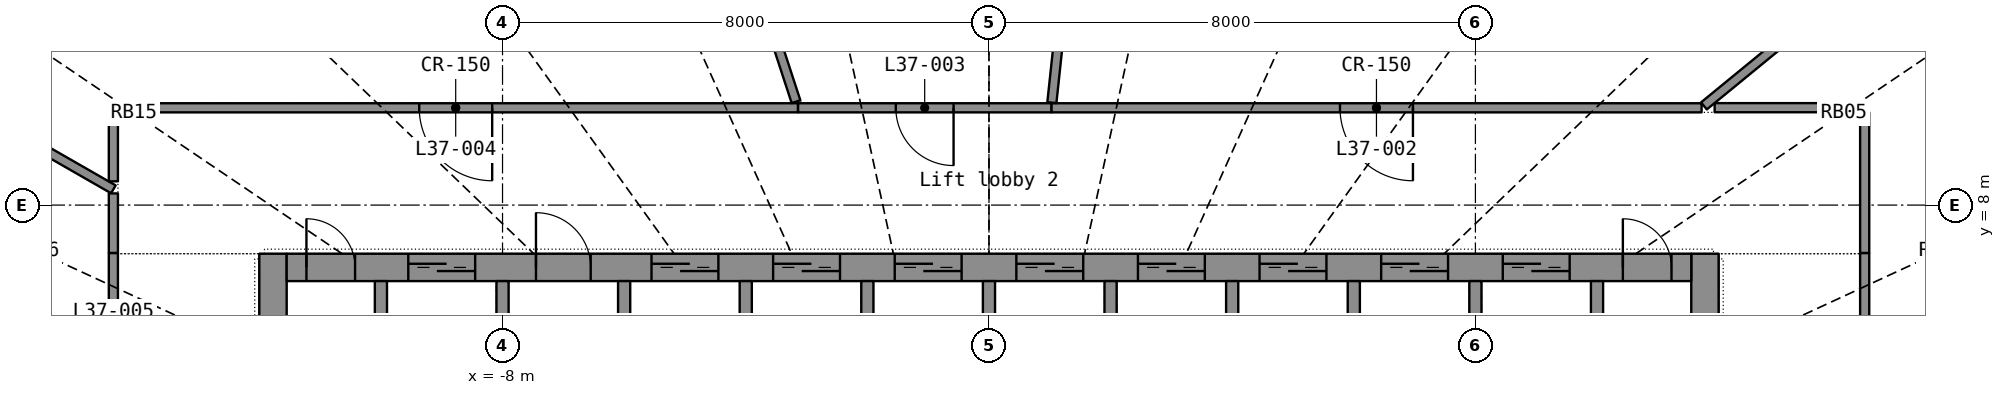
"""IFC4 building model, lengths in metres.
Left out: names, types, materials, properties, quantities, classifications, styles, units other than length and angle.
Written with IfcOpenShell. Run it as: python <this file> out.ifc"""

import sys

from ifc_helpers import new_model, si_unit, direction, frame, frame_2d, origin, place, context, subcontext, project, spatial, rectangle, extrude, element, fill, save


model = new_model("IFC4")
c1 = context("Model", 3, precision=1e-05, world=origin(), true_north=direction((0.0, 1.0)))
c2 = subcontext(c1, "Body", "Model", "MODEL_VIEW")
j1 = project(units=[si_unit("LENGTHUNIT", "METRE"), si_unit("PLANEANGLEUNIT", "RADIAN")], contexts=[c1])
p1 = place(None, origin())
s1 = spatial("IfcSite", under=j1, at=p1, CompositionType="ELEMENT")
p2 = place(p1, origin())
s2 = spatial("IfcBuilding", under=s1, at=p2, CompositionType="ELEMENT")
p3 = place(p2, frame((0.0, 0.0, 157.1)))
s3 = spatial("IfcBuildingStorey", under=s2, at=p3, CompositionType="ELEMENT", Elevation=157.1)
p4 = place(p3, frame((-11.775, -7.2, 0.0), z_axis=(0.0, 0.0, 1.0), x_axis=(0.0, 1.0, 0.0)))
e1 = element("IfcWall", 1, at=p4, inside=s3, PredefinedType="SHEAR", context=c2, shape_type="SweptSolid", body=[
    extrude(rectangle(XDim=14.4, YDim=0.45, at=frame_2d((7.2, 0.0))), origin(), (0.0, 0.0, 1.0), 3.3),
])
p5 = place(p4, frame((6.5, 0.0, 0.0)))
e2 = element("IfcOpeningElement", 2, at=p5, cuts=e1, PredefinedType="OPENING", context=c2, shape_type="SweptSolid", body=[
    extrude(rectangle(XDim=1.4, YDim=2.2, at=frame_2d((0.7, 1.1))), frame((0.0, 0.235, 0.0), z_axis=(0.0, -1.0, 0.0), x_axis=(1.0, 0.0, 0.0)), (0.0, 0.0, 1.0), 0.47),
])
p6 = place(p3, frame((11.775, -7.2, 0.0), z_axis=(0.0, 0.0, 1.0), x_axis=(0.0, 1.0, 0.0)))
e3 = element("IfcWall", 3, at=p6, inside=s3, PredefinedType="SHEAR", context=c2, shape_type="SweptSolid", body=[
    extrude(rectangle(XDim=14.4, YDim=0.45, at=frame_2d((7.2, 0.0))), origin(), (0.0, 0.0, 1.0), 3.3),
])
p7 = place(p6, frame((6.5, 0.0, 0.0)))
e4 = element("IfcOpeningElement", 4, at=p7, cuts=e3, PredefinedType="OPENING", context=c2, shape_type="SweptSolid", body=[
    extrude(rectangle(XDim=1.4, YDim=2.2, at=frame_2d((0.7, 1.1))), frame((0.0, 0.235, 0.0), z_axis=(0.0, -1.0, 0.0), x_axis=(1.0, 0.0, 0.0)), (0.0, 0.0, 1.0), 0.47),
])
p8 = place(p3, frame((-11.55, 6.975, 0.0), z_axis=(0.0, 0.0, 1.0), x_axis=(1.0, 0.0, 0.0)))
e5 = element("IfcWall", 5, at=p8, inside=s3, PredefinedType="SHEAR", context=c2, shape_type="SweptSolid", body=[
    extrude(rectangle(XDim=23.1, YDim=0.45, at=frame_2d((11.55, 0.0))), origin(), (0.0, 0.0, 1.0), 3.3),
])
p9 = place(p8, frame((2.0, 0.0, 0.0)))
e6 = element("IfcOpeningElement", 6, at=p9, cuts=e5, PredefinedType="OPENING", context=c2, shape_type="SweptSolid", body=[
    extrude(rectangle(XDim=1.1, YDim=2.2, at=frame_2d((0.55, 1.1))), frame((0.0, 0.235, 0.0), z_axis=(0.0, -1.0, 0.0), x_axis=(1.0, 0.0, 0.0)), (0.0, 0.0, 1.0), 0.47),
])
p10 = place(p8, frame((6.0, 0.0, 0.0)))
e7 = element("IfcOpeningElement", 7, at=p10, cuts=e5, PredefinedType="OPENING", context=c2, shape_type="SweptSolid", body=[
    extrude(rectangle(XDim=1.1, YDim=2.2, at=frame_2d((0.55, 1.1))), frame((0.0, 0.235, 0.0), z_axis=(0.0, -1.0, 0.0), x_axis=(1.0, 0.0, 0.0)), (0.0, 0.0, 1.0), 0.47),
])
p11 = place(p8, frame((8.0, 0.0, 0.0)))
e8 = element("IfcOpeningElement", 8, at=p11, cuts=e5, PredefinedType="OPENING", context=c2, shape_type="SweptSolid", body=[
    extrude(rectangle(XDim=1.1, YDim=2.2, at=frame_2d((0.55, 1.1))), frame((0.0, 0.235, 0.0), z_axis=(0.0, -1.0, 0.0), x_axis=(1.0, 0.0, 0.0)), (0.0, 0.0, 1.0), 0.47),
])
p12 = place(p8, frame((10.0, 0.0, 0.0)))
e9 = element("IfcOpeningElement", 9, at=p12, cuts=e5, PredefinedType="OPENING", context=c2, shape_type="SweptSolid", body=[
    extrude(rectangle(XDim=1.1, YDim=2.2, at=frame_2d((0.55, 1.1))), frame((0.0, 0.235, 0.0), z_axis=(0.0, -1.0, 0.0), x_axis=(1.0, 0.0, 0.0)), (0.0, 0.0, 1.0), 0.47),
])
p13 = place(p8, frame((12.0, 0.0, 0.0)))
e10 = element("IfcOpeningElement", 10, at=p13, cuts=e5, PredefinedType="OPENING", context=c2, shape_type="SweptSolid", body=[
    extrude(rectangle(XDim=1.1, YDim=2.2, at=frame_2d((0.55, 1.1))), frame((0.0, 0.235, 0.0), z_axis=(0.0, -1.0, 0.0), x_axis=(1.0, 0.0, 0.0)), (0.0, 0.0, 1.0), 0.47),
])
p14 = place(p8, frame((14.0, 0.0, 0.0)))
e11 = element("IfcOpeningElement", 11, at=p14, cuts=e5, PredefinedType="OPENING", context=c2, shape_type="SweptSolid", body=[
    extrude(rectangle(XDim=1.1, YDim=2.2, at=frame_2d((0.55, 1.1))), frame((0.0, 0.235, 0.0), z_axis=(0.0, -1.0, 0.0), x_axis=(1.0, 0.0, 0.0)), (0.0, 0.0, 1.0), 0.47),
])
p15 = place(p8, frame((16.0, 0.0, 0.0)))
e12 = element("IfcOpeningElement", 12, at=p15, cuts=e5, PredefinedType="OPENING", context=c2, shape_type="SweptSolid", body=[
    extrude(rectangle(XDim=1.1, YDim=2.2, at=frame_2d((0.55, 1.1))), frame((0.0, 0.235, 0.0), z_axis=(0.0, -1.0, 0.0), x_axis=(1.0, 0.0, 0.0)), (0.0, 0.0, 1.0), 0.47),
])
p16 = place(p8, frame((18.0, 0.0, 0.0)))
e13 = element("IfcOpeningElement", 13, at=p16, cuts=e5, PredefinedType="OPENING", context=c2, shape_type="SweptSolid", body=[
    extrude(rectangle(XDim=1.1, YDim=2.2, at=frame_2d((0.55, 1.1))), frame((0.0, 0.235, 0.0), z_axis=(0.0, -1.0, 0.0), x_axis=(1.0, 0.0, 0.0)), (0.0, 0.0, 1.0), 0.47),
])
p17 = place(p8, frame((20.0, 0.0, 0.0)))
e14 = element("IfcOpeningElement", 14, at=p17, cuts=e5, PredefinedType="OPENING", context=c2, shape_type="SweptSolid", body=[
    extrude(rectangle(XDim=1.1, YDim=2.2, at=frame_2d((0.55, 1.1))), frame((0.0, 0.235, 0.0), z_axis=(0.0, -1.0, 0.0), x_axis=(1.0, 0.0, 0.0)), (0.0, 0.0, 1.0), 0.47),
])
p18 = place(p8, frame((4.1, 0.0, 0.0)))
e15 = element("IfcOpeningElement", 15, at=p18, cuts=e5, PredefinedType="OPENING", context=c2, shape_type="SweptSolid", body=[
    extrude(rectangle(XDim=0.9, YDim=2.1, at=frame_2d((0.45, 1.05))), frame((0.0, 0.235, 0.0), z_axis=(0.0, -1.0, 0.0), x_axis=(1.0, 0.0, 0.0)), (0.0, 0.0, 1.0), 0.47),
])
p19 = place(p8, frame((0.325, 0.0, 0.0)))
e16 = element("IfcOpeningElement", 16, at=p19, cuts=e5, PredefinedType="OPENING", context=c2, shape_type="SweptSolid", body=[
    extrude(rectangle(XDim=0.8, YDim=2.05, at=frame_2d((0.4, 1.025))), frame((0.0, 0.235, 0.0), z_axis=(0.0, -1.0, 0.0), x_axis=(1.0, 0.0, 0.0)), (0.0, 0.0, 1.0), 0.47),
])
p20 = place(p8, frame((21.975, 0.0, 0.0)))
e17 = element("IfcOpeningElement", 17, at=p20, cuts=e5, PredefinedType="OPENING", context=c2, shape_type="SweptSolid", body=[
    extrude(rectangle(XDim=0.8, YDim=2.05, at=frame_2d((0.4, 1.025))), frame((0.0, 0.235, 0.0), z_axis=(0.0, -1.0, 0.0), x_axis=(1.0, 0.0, 0.0)), (0.0, 0.0, 1.0), 0.47),
])
for number, where, z_axis, x_axis in (
    (18, (-10.0, 3.9, 0.0), (0.0, 0.0, 1.0), (0.0, 1.0, 0.0)),
    (19, (-8.0, 3.9, 0.0), (0.0, 0.0, 1.0), (0.0, 1.0, 0.0)),
    (20, (-6.0, 3.9, 0.0), (0.0, 0.0, 1.0), (0.0, 1.0, 0.0)),
    (21, (-4.0, 3.9, 0.0), (0.0, 0.0, 1.0), (0.0, 1.0, 0.0)),
    (22, (-2.0, 3.9, 0.0), (0.0, 0.0, 1.0), (0.0, 1.0, 0.0)),
    (23, (0.0, 3.9, 0.0), (0.0, 0.0, 1.0), (0.0, 1.0, 0.0)),
    (24, (2.0, 3.9, 0.0), (0.0, 0.0, 1.0), (0.0, 1.0, 0.0)),
    (25, (4.0, 3.9, 0.0), (0.0, 0.0, 1.0), (0.0, 1.0, 0.0)),
    (26, (6.0, 3.9, 0.0), (0.0, 0.0, 1.0), (0.0, 1.0, 0.0)),
    (27, (8.0, 3.9, 0.0), (0.0, 0.0, 1.0), (0.0, 1.0, 0.0)),
    (28, (10.0, 3.9, 0.0), (0.0, 0.0, 1.0), (0.0, 1.0, 0.0)),
):
    element("IfcWall", number, at=place(p3, frame(where, z_axis=z_axis, x_axis=x_axis)), inside=s3, PredefinedType="SHEAR", context=c2, shape_type="SweptSolid", body=[
        extrude(rectangle(XDim=2.85, YDim=0.2, at=frame_2d((1.425, 0.0))), origin(), (0.0, 0.0, 1.0), 3.3),
    ])
p21 = place(p3, frame((-3.14, 9.6, 0.0), z_axis=(0.0, 0.0, 1.0), x_axis=(-1.0, 0.0, 0.0)))
e29 = element("IfcWall", 29, at=p21, inside=s3, PredefinedType="PARTITIONING", context=c2, shape_type="SweptSolid", body=[
    extrude(rectangle(XDim=11.26, YDim=0.15, at=frame_2d((5.63, 0.0))), origin(), (0.0, 0.0, 1.0), 2.4),
])
p22 = place(p21, frame((5.03, 0.0, 0.0)))
e30 = element("IfcOpeningElement", 30, at=p22, cuts=e29, PredefinedType="OPENING", context=c2, shape_type="SweptSolid", body=[
    extrude(rectangle(XDim=1.2, YDim=2.2, at=frame_2d((0.6, 1.1))), frame((0.0, 0.085, 0.0), z_axis=(0.0, -1.0, 0.0), x_axis=(1.0, 0.0, 0.0)), (0.0, 0.0, 1.0), 0.17),
])
p23 = place(p3, frame((11.72, 9.6, 0.0), z_axis=(0.0, 0.0, 1.0), x_axis=(-1.0, 0.0, 0.0)))
e31 = element("IfcWall", 31, at=p23, inside=s3, PredefinedType="PARTITIONING", context=c2, shape_type="SweptSolid", body=[
    extrude(rectangle(XDim=10.695, YDim=0.15, at=frame_2d((5.347, 0.0))), origin(), (0.0, 0.0, 1.0), 2.4),
])
p24 = place(p23, frame((4.747, 0.0, 0.0)))
e32 = element("IfcOpeningElement", 32, at=p24, cuts=e31, PredefinedType="OPENING", context=c2, shape_type="SweptSolid", body=[
    extrude(rectangle(XDim=1.2, YDim=2.2, at=frame_2d((0.6, 1.1))), frame((0.0, 0.085, 0.0), z_axis=(0.0, -1.0, 0.0), x_axis=(1.0, 0.0, 0.0)), (0.0, 0.0, 1.0), 0.17),
])
p25 = place(p3, frame((2.071, 19.393, 0.0), z_axis=(0.0, 0.0, 1.0), x_axis=(-0.106198491, -0.99434495, 0.0)))
e33 = element("IfcWall", 33, at=p25, inside=s3, PredefinedType="PARTITIONING", context=c2, shape_type="SweptSolid", body=[
    extrude(rectangle(XDim=9.763, YDim=0.15, at=frame_2d((4.882, 0.0))), origin(), (0.0, 0.0, 1.0), 2.4),
])
p26 = place(p3, frame((-6.152, 18.806, 0.0), z_axis=(0.0, 0.0, 1.0), x_axis=(0.310901784, -0.950442045, 0.0)))
e34 = element("IfcWall", 34, at=p26, inside=s3, PredefinedType="PARTITIONING", context=c2, shape_type="SweptSolid", body=[
    extrude(rectangle(XDim=9.58, YDim=0.15, at=frame_2d((4.79, 0.0))), origin(), (0.0, 0.0, 1.0), 2.4),
])
p27 = place(p3, frame((16.813, 13.772, 0.0), z_axis=(0.0, 0.0, 1.0), x_axis=(-0.773595956, -0.633679175, 0.0)))
e35 = element("IfcWall", 35, at=p27, inside=s3, PredefinedType="PARTITIONING", context=c2, shape_type="SweptSolid", body=[
    extrude(rectangle(XDim=6.535, YDim=0.15, at=frame_2d((3.267, 0.0))), origin(), (0.0, 0.0, 1.0), 2.4),
])
p28 = place(p3, frame((-19.483, 11.175, 0.0), z_axis=(0.0, 0.0, 1.0), x_axis=(0.867447243, -0.497529176, 0.0)))
e36 = element("IfcWall", 36, at=p28, inside=s3, PredefinedType="PARTITIONING", context=c2, shape_type="SweptSolid", body=[
    extrude(rectangle(XDim=5.86, YDim=0.15, at=frame_2d((2.93, 0.0))), origin(), (0.0, 0.0, 1.0), 2.4),
])
p29 = place(p3, frame((14.402, 1.579, 0.0), z_axis=(0.0, 0.0, 1.0), x_axis=(0.0, 1.0, 0.0)))
e37 = element("IfcWall", 37, at=p29, inside=s3, PredefinedType="PARTITIONING", context=c2, shape_type="SweptSolid", body=[
    extrude(rectangle(XDim=5.633, YDim=0.15, at=frame_2d((2.816, 0.0))), origin(), (0.0, 0.0, 1.0), 2.4),
])
p30 = place(p3, frame((1.025, 9.6, 0.0), z_axis=(0.0, 0.0, 1.0), x_axis=(-1.0, 0.0, 0.0)))
e38 = element("IfcWall", 38, at=p30, inside=s3, PredefinedType="PARTITIONING", context=c2, shape_type="SweptSolid", body=[
    extrude(rectangle(XDim=4.165, YDim=0.15, at=frame_2d((2.083, 0.0))), origin(), (0.0, 0.0, 1.0), 2.4),
])
p31 = place(p30, frame((1.607, 0.0, 0.0)))
e39 = element("IfcOpeningElement", 39, at=p31, cuts=e38, PredefinedType="OPENING", context=c2, shape_type="SweptSolid", body=[
    extrude(rectangle(XDim=0.95, YDim=2.15, at=frame_2d((0.475, 1.075))), frame((0.0, 0.085, 0.0), z_axis=(0.0, -1.0, 0.0), x_axis=(1.0, 0.0, 0.0)), (0.0, 0.0, 1.0), 0.17),
])
p32 = place(p3, frame((-14.4, 7.212, 0.0), z_axis=(0.0, 0.0, 1.0), x_axis=(0.0, -1.0, 0.0)))
e40 = element("IfcWall", 40, at=p32, inside=s3, PredefinedType="PARTITIONING", context=c2, shape_type="SweptSolid", body=[
    extrude(rectangle(XDim=3.956, YDim=0.15, at=frame_2d((1.978, 0.0))), origin(), (0.0, 0.0, 1.0), 2.4),
])
p33 = place(p32, frame((1.503, 0.0, 0.0)))
e41 = element("IfcOpeningElement", 41, at=p33, cuts=e40, PredefinedType="OPENING", context=c2, shape_type="SweptSolid", body=[
    extrude(rectangle(XDim=0.95, YDim=2.15, at=frame_2d((0.475, 1.075))), frame((0.0, 0.085, 0.0), z_axis=(0.0, -1.0, 0.0), x_axis=(1.0, 0.0, 0.0)), (0.0, 0.0, 1.0), 0.17),
])
p34 = place(p3, frame((14.402, 9.602, 0.0), z_axis=(0.0, 0.0, 1.0), x_axis=(-1.0, 0.0, 0.0)))
e42 = element("IfcWall", 42, at=p34, inside=s3, PredefinedType="PARTITIONING", context=c2, shape_type="SweptSolid", body=[
    extrude(rectangle(XDim=2.468, YDim=0.15, at=frame_2d((1.234, 0.0))), origin(), (0.0, 0.0, 1.0), 2.4),
])
p35 = place(p3, frame((14.402, 7.213, 0.0), z_axis=(0.0, 0.0, 1.0), x_axis=(0.0, 1.0, 0.0)))
e43 = element("IfcWall", 43, at=p35, inside=s3, PredefinedType="PARTITIONING", context=c2, shape_type="SweptSolid", body=[
    extrude(rectangle(XDim=2.312, YDim=0.15, at=frame_2d((1.156, 0.0))), origin(), (0.0, 0.0, 1.0), 2.4),
])
p36 = place(p3, frame((-14.4, 9.523, 0.0), z_axis=(0.0, 0.0, 1.0), x_axis=(0.0, -1.0, 0.0)))
e44 = element("IfcWall", 44, at=p36, inside=s3, PredefinedType="PARTITIONING", context=c2, shape_type="SweptSolid", body=[
    extrude(rectangle(XDim=1.132, YDim=0.15, at=frame_2d((0.566, 0.0))), origin(), (0.0, 0.0, 1.0), 2.4),
])
p37 = place(p3, frame((-14.4, 8.192, 0.0), z_axis=(0.0, 0.0, 1.0), x_axis=(0.0, -1.0, 0.0)))
e45 = element("IfcWall", 45, at=p37, inside=s3, PredefinedType="PARTITIONING", context=c2, shape_type="SweptSolid", body=[
    extrude(rectangle(XDim=0.979, YDim=0.15, at=frame_2d((0.49, 0.0))), origin(), (0.0, 0.0, 1.0), 2.4),
])
p38 = place(p9, origin())
e46 = element("IfcDoor", 46, at=p38, inside=s3, OperationType="DOUBLE_DOOR_SLIDING", PredefinedType="DOOR", context=c2, shape_type="SweptSolid", body=[
    extrude(rectangle(XDim=1.1, YDim=2.2, at=frame_2d((0.55, 1.1))), frame((0.0, 0.025, 0.0), z_axis=(0.0, -1.0, 0.0), x_axis=(1.0, 0.0, 0.0)), (0.0, 0.0, 1.0), 0.05),
])
fill(e6, e46)
p39 = place(p10, origin())
e47 = element("IfcDoor", 47, at=p39, inside=s3, OperationType="DOUBLE_DOOR_SLIDING", PredefinedType="DOOR", context=c2, shape_type="SweptSolid", body=[
    extrude(rectangle(XDim=1.1, YDim=2.2, at=frame_2d((0.55, 1.1))), frame((0.0, 0.025, 0.0), z_axis=(0.0, -1.0, 0.0), x_axis=(1.0, 0.0, 0.0)), (0.0, 0.0, 1.0), 0.05),
])
fill(e7, e47)
p40 = place(p11, origin())
e48 = element("IfcDoor", 48, at=p40, inside=s3, OperationType="DOUBLE_DOOR_SLIDING", PredefinedType="DOOR", context=c2, shape_type="SweptSolid", body=[
    extrude(rectangle(XDim=1.1, YDim=2.2, at=frame_2d((0.55, 1.1))), frame((0.0, 0.025, 0.0), z_axis=(0.0, -1.0, 0.0), x_axis=(1.0, 0.0, 0.0)), (0.0, 0.0, 1.0), 0.05),
])
fill(e8, e48)
p41 = place(p12, origin())
e49 = element("IfcDoor", 49, at=p41, inside=s3, OperationType="DOUBLE_DOOR_SLIDING", PredefinedType="DOOR", context=c2, shape_type="SweptSolid", body=[
    extrude(rectangle(XDim=1.1, YDim=2.2, at=frame_2d((0.55, 1.1))), frame((0.0, 0.025, 0.0), z_axis=(0.0, -1.0, 0.0), x_axis=(1.0, 0.0, 0.0)), (0.0, 0.0, 1.0), 0.05),
])
fill(e9, e49)
p42 = place(p13, origin())
e50 = element("IfcDoor", 50, at=p42, inside=s3, OperationType="DOUBLE_DOOR_SLIDING", PredefinedType="DOOR", context=c2, shape_type="SweptSolid", body=[
    extrude(rectangle(XDim=1.1, YDim=2.2, at=frame_2d((0.55, 1.1))), frame((0.0, 0.025, 0.0), z_axis=(0.0, -1.0, 0.0), x_axis=(1.0, 0.0, 0.0)), (0.0, 0.0, 1.0), 0.05),
])
fill(e10, e50)
p43 = place(p14, origin())
e51 = element("IfcDoor", 51, at=p43, inside=s3, OperationType="DOUBLE_DOOR_SLIDING", PredefinedType="DOOR", context=c2, shape_type="SweptSolid", body=[
    extrude(rectangle(XDim=1.1, YDim=2.2, at=frame_2d((0.55, 1.1))), frame((0.0, 0.025, 0.0), z_axis=(0.0, -1.0, 0.0), x_axis=(1.0, 0.0, 0.0)), (0.0, 0.0, 1.0), 0.05),
])
fill(e11, e51)
p44 = place(p15, origin())
e52 = element("IfcDoor", 52, at=p44, inside=s3, OperationType="DOUBLE_DOOR_SLIDING", PredefinedType="DOOR", context=c2, shape_type="SweptSolid", body=[
    extrude(rectangle(XDim=1.1, YDim=2.2, at=frame_2d((0.55, 1.1))), frame((0.0, 0.025, 0.0), z_axis=(0.0, -1.0, 0.0), x_axis=(1.0, 0.0, 0.0)), (0.0, 0.0, 1.0), 0.05),
])
fill(e12, e52)
p45 = place(p16, origin())
e53 = element("IfcDoor", 53, at=p45, inside=s3, OperationType="DOUBLE_DOOR_SLIDING", PredefinedType="DOOR", context=c2, shape_type="SweptSolid", body=[
    extrude(rectangle(XDim=1.1, YDim=2.2, at=frame_2d((0.55, 1.1))), frame((0.0, 0.025, 0.0), z_axis=(0.0, -1.0, 0.0), x_axis=(1.0, 0.0, 0.0)), (0.0, 0.0, 1.0), 0.05),
])
fill(e13, e53)
p46 = place(p17, origin())
e54 = element("IfcDoor", 54, at=p46, inside=s3, OperationType="DOUBLE_DOOR_SLIDING", PredefinedType="DOOR", context=c2, shape_type="SweptSolid", body=[
    extrude(rectangle(XDim=1.1, YDim=2.2, at=frame_2d((0.55, 1.1))), frame((0.0, 0.025, 0.0), z_axis=(0.0, -1.0, 0.0), x_axis=(1.0, 0.0, 0.0)), (0.0, 0.0, 1.0), 0.05),
])
fill(e14, e54)
p47 = place(p18, origin())
e55 = element("IfcDoor", 55, at=p47, inside=s3, OperationType="SINGLE_SWING_LEFT", PredefinedType="DOOR", context=c2, shape_type="SweptSolid", body=[
    extrude(rectangle(XDim=0.9, YDim=2.1, at=frame_2d((0.45, 1.05))), frame((0.0, 0.025, 0.0), z_axis=(0.0, -1.0, 0.0), x_axis=(1.0, 0.0, 0.0)), (0.0, 0.0, 1.0), 0.05),
])
fill(e15, e55)
p48 = place(p19, origin())
e56 = element("IfcDoor", 56, at=p48, inside=s3, OperationType="SINGLE_SWING_LEFT", PredefinedType="DOOR", context=c2, shape_type="SweptSolid", body=[
    extrude(rectangle(XDim=0.8, YDim=2.05, at=frame_2d((0.4, 1.025))), frame((0.0, 0.025, 0.0), z_axis=(0.0, -1.0, 0.0), x_axis=(1.0, 0.0, 0.0)), (0.0, 0.0, 1.0), 0.05),
])
fill(e16, e56)
p49 = place(p20, origin())
e57 = element("IfcDoor", 57, at=p49, inside=s3, OperationType="SINGLE_SWING_LEFT", PredefinedType="DOOR", context=c2, shape_type="SweptSolid", body=[
    extrude(rectangle(XDim=0.8, YDim=2.05, at=frame_2d((0.4, 1.025))), frame((0.0, 0.025, 0.0), z_axis=(0.0, -1.0, 0.0), x_axis=(1.0, 0.0, 0.0)), (0.0, 0.0, 1.0), 0.05),
])
fill(e17, e57)
p50 = place(p24, origin())
e58 = element("IfcDoor", 58, at=p50, inside=s3, OperationType="DOUBLE_DOOR_SINGLE_SWING", PredefinedType="DOOR", context=c2, shape_type="SweptSolid", body=[
    extrude(rectangle(XDim=1.2, YDim=2.2, at=frame_2d((0.6, 1.1))), frame((0.0, 0.025, 0.0), z_axis=(0.0, -1.0, 0.0), x_axis=(1.0, 0.0, 0.0)), (0.0, 0.0, 1.0), 0.05),
])
fill(e32, e58)
p51 = place(p31, origin())
e59 = element("IfcDoor", 59, at=p51, inside=s3, OperationType="SINGLE_SWING_LEFT", PredefinedType="DOOR", context=c2, shape_type="SweptSolid", body=[
    extrude(rectangle(XDim=0.95, YDim=2.15, at=frame_2d((0.475, 1.075))), frame((0.0, 0.025, 0.0), z_axis=(0.0, -1.0, 0.0), x_axis=(1.0, 0.0, 0.0)), (0.0, 0.0, 1.0), 0.05),
])
fill(e39, e59)
p52 = place(p22, origin())
e60 = element("IfcDoor", 60, at=p52, inside=s3, OperationType="DOUBLE_DOOR_SINGLE_SWING", PredefinedType="DOOR", context=c2, shape_type="SweptSolid", body=[
    extrude(rectangle(XDim=1.2, YDim=2.2, at=frame_2d((0.6, 1.1))), frame((0.0, 0.025, 0.0), z_axis=(0.0, -1.0, 0.0), x_axis=(1.0, 0.0, 0.0)), (0.0, 0.0, 1.0), 0.05),
])
fill(e30, e60)
save(model, sys.argv[1])
